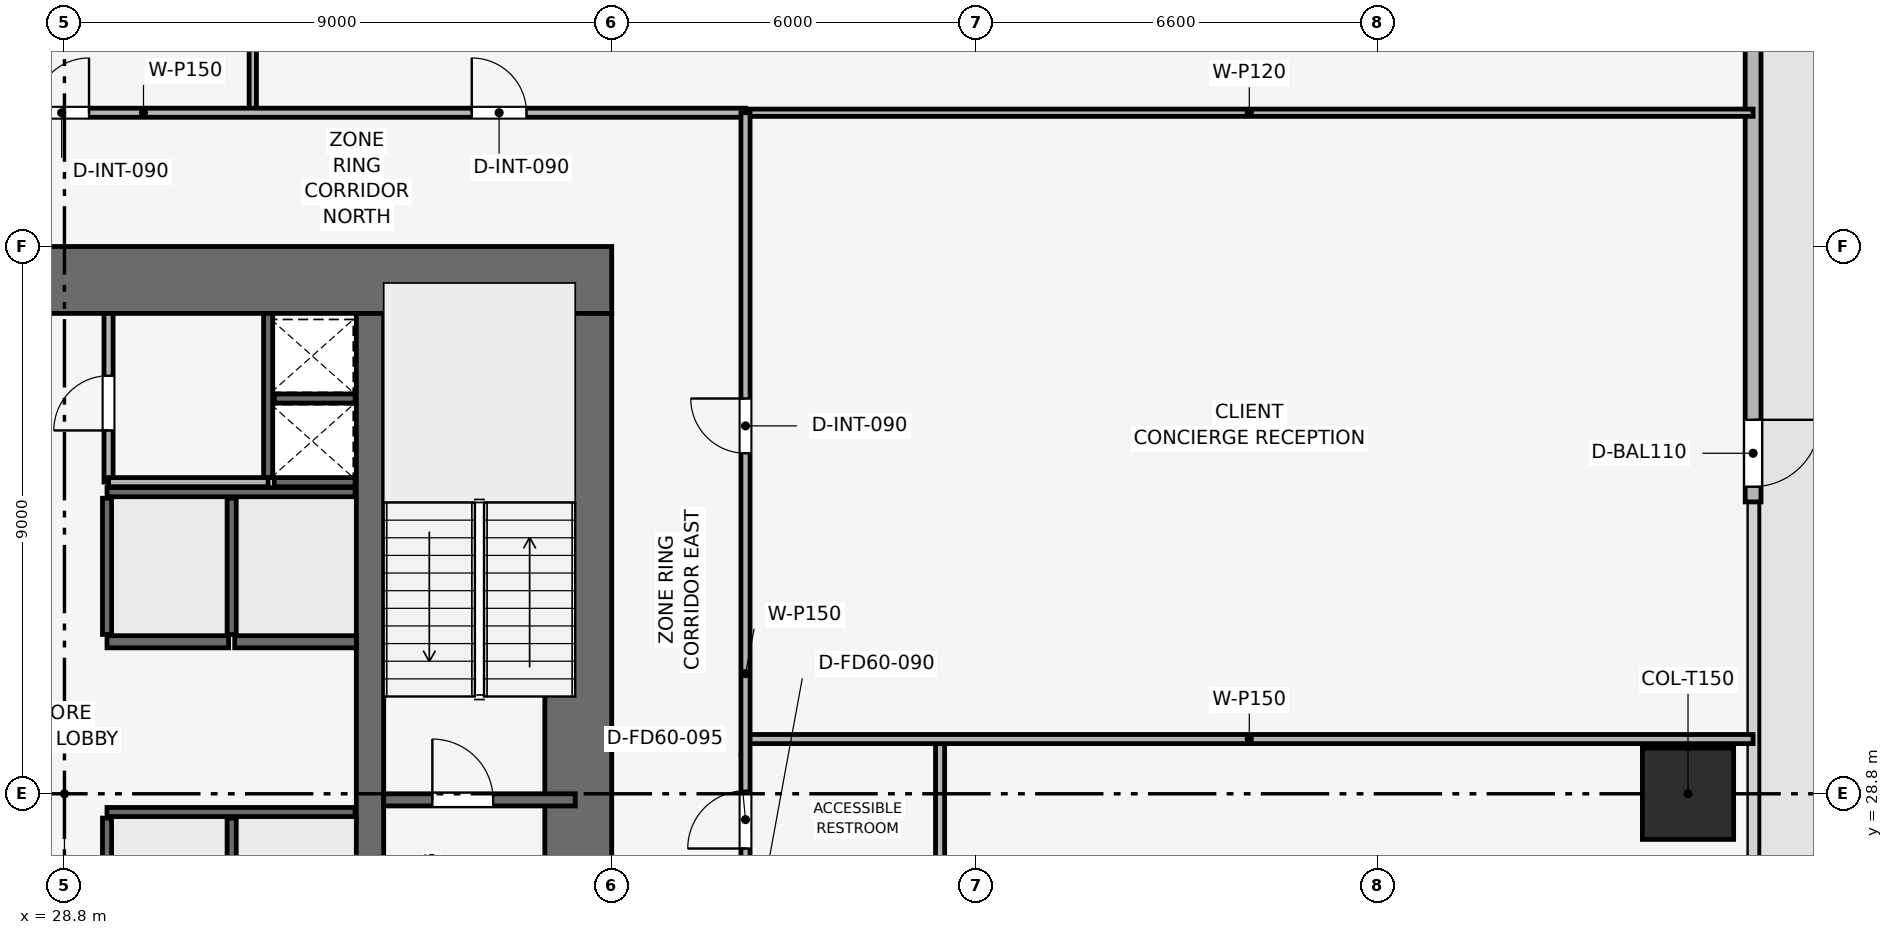
"""IFC4 building model, lengths in metres.
Left out: names, types, materials, properties, quantities, classifications, styles, units other than length and angle.
Written with IfcOpenShell. Run it as: python <this file> out.ifc"""

import sys

from ifc_helpers import new_model, si_unit, direction, frame, frame_2d, origin, origin_2d, place, context, subcontext, project, spatial, rectangle, extrude, element, fill, save


model = new_model("IFC4")
c1 = context("Model", 3, precision=1e-05, world=origin(), true_north=direction((0.0, 1.0)))
c2 = subcontext(c1, "Body", "Model", "MODEL_VIEW")
j1 = project(units=[si_unit("LENGTHUNIT", "METRE"), si_unit("PLANEANGLEUNIT", "RADIAN")], contexts=[c1])
p1 = place(None, origin())
s1 = spatial("IfcSite", under=j1, at=p1, CompositionType="ELEMENT")
p2 = place(p1, origin())
s2 = spatial("IfcBuilding", under=s1, at=p2, CompositionType="ELEMENT")
p3 = place(p2, frame((0.0, 0.0, 72.9)))
s3 = spatial("IfcBuildingStorey", under=s2, at=p3, CompositionType="ELEMENT", Elevation=72.9)
p4 = place(p3, frame((19.8, 37.25, 0.0), z_axis=(0.0, 0.0, 1.0), x_axis=(1.0, 0.0, 0.0)))
e1 = element("IfcWall", 1, at=p4, inside=s3, PredefinedType="SHEAR", context=c2, shape_type="SweptSolid", body=[
    extrude(rectangle(XDim=18.0, YDim=1.1, at=frame_2d((9.0, 0.0))), origin(), (0.0, 0.0, 1.0), 3.9),
])
p5 = place(p4, frame((7.05, 0.0, 0.0)))
e2 = element("IfcOpeningElement", 2, at=p5, cuts=e1, PredefinedType="OPENING", context=c2, shape_type="SweptSolid", body=[
    extrude(rectangle(XDim=1.1, YDim=2.15, at=frame_2d((0.55, 1.075))), frame((0.0, 0.56, 0.0), z_axis=(0.0, -1.0, 0.0), x_axis=(1.0, 0.0, 0.0)), (0.0, 0.0, 1.0), 1.12),
])
p6 = place(p3, frame((37.25, 20.9, 0.0), z_axis=(0.0, 0.0, 1.0), x_axis=(0.0, 1.0, 0.0)))
e3 = element("IfcWall", 3, at=p6, inside=s3, PredefinedType="SHEAR", context=c2, shape_type="SweptSolid", body=[
    extrude(rectangle(XDim=15.8, YDim=1.1, at=frame_2d((7.9, 0.0))), origin(), (0.0, 0.0, 1.0), 3.9),
])
p7 = place(p6, frame((4.4, 0.0, 0.0)))
e4 = element("IfcOpeningElement", 4, at=p7, cuts=e3, PredefinedType="OPENING", context=c2, shape_type="SweptSolid", body=[
    extrude(rectangle(XDim=1.1, YDim=2.15, at=frame_2d((0.55, 1.075))), frame((0.0, 0.56, 0.0), z_axis=(0.0, -1.0, 0.0), x_axis=(1.0, 0.0, 0.0)), (0.0, 0.0, 1.0), 1.12),
])
p8 = place(p3, frame((33.825, 20.9, 0.0), z_axis=(0.0, 0.0, 1.0), x_axis=(0.0, 1.0, 0.0)))
e5 = element("IfcWall", 5, at=p8, inside=s3, PredefinedType="SHEAR", context=c2, shape_type="SweptSolid", body=[
    extrude(rectangle(XDim=15.8, YDim=0.45, at=frame_2d((7.9, 0.0))), origin(), (0.0, 0.0, 1.0), 3.9),
])
p9 = place(p3, frame((55.5, 28.8, 0.003), z_axis=(0.0, 0.0, 1.0), x_axis=(1.0, 0.0, 0.0)))
e6 = element("IfcColumn", 6, at=p9, inside=s3, PredefinedType="COLUMN", context=c2, shape_type="SweptSolid", body=[
    extrude(rectangle(XDim=1.5, YDim=1.5, at=origin_2d()), origin(), (0.0, 0.0, 1.0), 3.644),
])
p10 = place(p3, frame((56.57, 48.9, 0.0), z_axis=(0.0, 0.0, 1.0), x_axis=(0.0, -1.0, 0.0)))
e7 = element("IfcWall", 7, at=p10, inside=s3, PredefinedType="SOLIDWALL", context=c2, shape_type="SweptSolid", body=[
    extrude(rectangle(XDim=15.3, YDim=0.26, at=frame_2d((7.65, 0.0))), origin(), (0.0, 0.0, 1.0), 3.65),
])
p11 = place(p10, frame((13.95, 0.0, 0.0)))
e8 = element("IfcOpeningElement", 8, at=p11, cuts=e7, PredefinedType="OPENING", context=c2, shape_type="SweptSolid", body=[
    extrude(rectangle(XDim=1.1, YDim=2.2, at=frame_2d((0.55, 1.1))), frame((0.0, 0.14, 0.0), z_axis=(0.0, -1.0, 0.0), x_axis=(1.0, 0.0, 0.0)), (0.0, 0.0, 1.0), 0.28),
])
p12 = place(p3, frame((34.05, 28.7, 0.0), z_axis=(0.0, 0.0, 1.0), x_axis=(1.0, 0.0, 0.0)))
e9 = element("IfcWall", 9, at=p12, inside=s3, PredefinedType="SHEAR", context=c2, shape_type="SweptSolid", body=[
    extrude(rectangle(XDim=3.15, YDim=0.2, at=frame_2d((1.575, 0.0))), origin(), (0.0, 0.0, 1.0), 3.65),
])
p13 = place(p12, frame((0.8, 0.0, 0.0)))
e10 = element("IfcOpeningElement", 10, at=p13, cuts=e9, PredefinedType="OPENING", context=c2, shape_type="SweptSolid", body=[
    extrude(rectangle(XDim=1.0, YDim=2.1, at=frame_2d((0.5, 1.05))), frame((0.0, 0.11, 0.0), z_axis=(0.0, -1.0, 0.0), x_axis=(1.0, 0.0, 0.0)), (0.0, 0.0, 1.0), 0.22),
])
p14 = place(p3, frame((32.15, 34.0, 0.0), z_axis=(0.0, 0.0, 1.0), x_axis=(0.0, 1.0, 0.0)))
e11 = element("IfcWall", 11, at=p14, inside=s3, PredefinedType="SHEAR", context=c2, shape_type="SweptSolid", body=[
    extrude(rectangle(XDim=2.7, YDim=0.15, at=frame_2d((1.35, 0.0))), origin(), (0.0, 0.0, 1.0), 3.65),
])
for number, where, z_axis, x_axis in (
    (12, (32.25, 33.925, 0.0), (0.0, 0.0, 1.0), (1.0, 0.0, 0.0)),
    (13, (32.25, 35.3, 0.0), (0.0, 0.0, 1.0), (1.0, 0.0, 0.0)),
):
    element("IfcWall", number, at=place(p3, frame(where, z_axis=z_axis, x_axis=x_axis)), inside=s3, PredefinedType="SHEAR", context=c2, shape_type="SweptSolid", body=[
        extrude(rectangle(XDim=1.33, YDim=0.15, at=frame_2d((0.665, 0.0))), origin(), (0.0, 0.0, 1.0), 3.65),
    ])
for number, where, z_axis, x_axis in (
    (14, (29.5, 31.3, 0.0), (0.0, 0.0, 1.0), (1.0, 0.0, 0.0)),
    (15, (31.6, 31.3, 0.0), (0.0, 0.0, 1.0), (1.0, 0.0, 0.0)),
):
    element("IfcWall", number, at=place(p3, frame(where, z_axis=z_axis, x_axis=x_axis)), inside=s3, PredefinedType="SHEAR", context=c2, shape_type="SweptSolid", body=[
        extrude(rectangle(XDim=2.0, YDim=0.2, at=frame_2d((1.0, 0.0))), origin(), (0.0, 0.0, 1.0), 3.65),
    ])
p15 = place(p3, frame((29.5, 28.5, 0.0), z_axis=(0.0, 0.0, 1.0), x_axis=(1.0, 0.0, 0.0)))
e16 = element("IfcWall", 16, at=p15, inside=s3, PredefinedType="SHEAR", context=c2, shape_type="SweptSolid", body=[
    extrude(rectangle(XDim=4.08, YDim=0.15, at=frame_2d((2.04, 0.0))), origin(), (0.0, 0.0, 1.0), 3.65),
])
for number, where, z_axis, x_axis in (
    (17, (29.5, 26.12, 0.0), (0.0, 0.0, 1.0), (0.0, 1.0, 0.0)),
    (18, (31.55, 26.12, 0.0), (0.0, 0.0, 1.0), (0.0, 1.0, 0.0)),
):
    element("IfcWall", number, at=place(p3, frame(where, z_axis=z_axis, x_axis=x_axis)), inside=s3, PredefinedType="SHEAR", context=c2, shape_type="SweptSolid", body=[
        extrude(rectangle(XDim=2.28, YDim=0.15, at=frame_2d((1.14, 0.0))), origin(), (0.0, 0.0, 1.0), 3.65),
    ])
p16 = place(p3, frame((29.5, 33.76, 0.0), z_axis=(0.0, 0.0, 1.0), x_axis=(1.0, 0.0, 0.0)))
e19 = element("IfcWall", 19, at=p16, inside=s3, PredefinedType="SHEAR", context=c2, shape_type="SweptSolid", body=[
    extrude(rectangle(XDim=4.08, YDim=0.15, at=frame_2d((2.04, 0.0))), origin(), (0.0, 0.0, 1.0), 3.65),
])
for number, where, z_axis, x_axis in (
    (20, (29.5, 31.42, 0.0), (0.0, 0.0, 1.0), (0.0, 1.0, 0.0)),
    (21, (31.55, 31.42, 0.0), (0.0, 0.0, 1.0), (0.0, 1.0, 0.0)),
):
    element("IfcWall", number, at=place(p3, frame(where, z_axis=z_axis, x_axis=x_axis)), inside=s3, PredefinedType="SHEAR", context=c2, shape_type="SweptSolid", body=[
        extrude(rectangle(XDim=2.24, YDim=0.15, at=frame_2d((1.12, 0.0))), origin(), (0.0, 0.0, 1.0), 3.65),
    ])
p17 = place(p3, frame((29.525, 33.925, 0.0), z_axis=(0.0, 0.0, 1.0), x_axis=(0.0, 1.0, 0.0)))
e22 = element("IfcWall", 22, at=p17, inside=s3, PredefinedType="PARTITIONING", context=c2, shape_type="SweptSolid", body=[
    extrude(rectangle(XDim=2.775, YDim=0.15, at=frame_2d((1.387, 0.0))), origin(), (0.0, 0.0, 1.0), 3.65),
])
p18 = place(p17, frame((0.85, 0.0, 0.0)))
e23 = element("IfcOpeningElement", 23, at=p18, cuts=e22, PredefinedType="OPENING", context=c2, shape_type="SweptSolid", body=[
    extrude(rectangle(XDim=0.9, YDim=2.1, at=frame_2d((0.45, 1.05))), frame((0.0, 0.085, 0.0), z_axis=(0.0, -1.0, 0.0), x_axis=(1.0, 0.0, 0.0)), (0.0, 0.0, 1.0), 0.17),
])
p19 = place(p3, frame((29.525, 33.925, 0.0), z_axis=(0.0, 0.0, 1.0), x_axis=(1.0, 0.0, 0.0)))
e24 = element("IfcWall", 24, at=p19, inside=s3, PredefinedType="PARTITIONING", context=c2, shape_type="SweptSolid", body=[
    extrude(rectangle(XDim=2.625, YDim=0.15, at=frame_2d((1.312, 0.0))), origin(), (0.0, 0.0, 1.0), 3.65),
])
for number, where, z_axis, x_axis in (
    (25, (31.897, 40.0, 0.0), (0.0, 0.0, 1.0), (0.0, 1.0, 0.0)),
    (26, (40.0, 40.0, 0.0), (0.0, 0.0, 1.0), (1.0, 0.0, 0.0)),
):
    element("IfcWall", number, at=place(p3, frame(where, z_axis=z_axis, x_axis=x_axis)), inside=s3, PredefinedType="PARTITIONING", context=c2, shape_type="SweptSolid", body=[
        extrude(rectangle(XDim=16.57, YDim=0.12, at=frame_2d((8.285, 0.0))), origin(), (0.0, 0.0, 1.0), 2.935),
    ])
p20 = place(p3, frame((43.2, 21.3, 0.0), z_axis=(0.0, 0.0, 1.0), x_axis=(0.0, 1.0, 0.0)))
e27 = element("IfcWall", 27, at=p20, inside=s3, PredefinedType="PARTITIONING", context=c2, shape_type="SweptSolid", body=[
    extrude(rectangle(XDim=8.4, YDim=0.15, at=frame_2d((4.2, 0.0))), origin(), (0.0, 0.0, 1.0), 3.085),
])
p21 = place(p3, frame((40.0, 29.7, 0.0), z_axis=(0.0, 0.0, 1.0), x_axis=(1.0, 0.0, 0.0)))
e28 = element("IfcWall", 28, at=p21, inside=s3, PredefinedType="PARTITIONING", context=c2, shape_type="SweptSolid", body=[
    extrude(rectangle(XDim=16.57, YDim=0.15, at=frame_2d((8.285, 0.0))), origin(), (0.0, 0.0, 1.0), 2.935),
])
p22 = place(p3, frame((17.6, 40.0, 0.0), z_axis=(0.0, 0.0, 1.0), x_axis=(1.0, 0.0, 0.0)))
e29 = element("IfcWall", 29, at=p22, inside=s3, PredefinedType="PARTITIONING", context=c2, shape_type="SweptSolid", body=[
    extrude(rectangle(XDim=22.4, YDim=0.15, at=frame_2d((11.2, 0.0))), origin(), (0.0, 0.0, 1.0), 3.085),
])
p23 = place(p22, frame((0.7, 0.0, 0.0)))
e30 = element("IfcOpeningElement", 30, at=p23, cuts=e29, PredefinedType="OPENING", context=c2, shape_type="SweptSolid", body=[
    extrude(rectangle(XDim=0.9, YDim=2.1, at=frame_2d((0.45, 1.05))), frame((0.0, 0.085, 0.0), z_axis=(0.0, -1.0, 0.0), x_axis=(1.0, 0.0, 0.0)), (0.0, 0.0, 1.0), 0.17),
])
p24 = place(p22, frame((4.706, 0.0, 0.0)))
e31 = element("IfcOpeningElement", 31, at=p24, cuts=e29, PredefinedType="OPENING", context=c2, shape_type="SweptSolid", body=[
    extrude(rectangle(XDim=0.9, YDim=2.1, at=frame_2d((0.45, 1.05))), frame((0.0, 0.085, 0.0), z_axis=(0.0, -1.0, 0.0), x_axis=(1.0, 0.0, 0.0)), (0.0, 0.0, 1.0), 0.17),
])
p25 = place(p22, frame((10.704, 0.0, 0.0)))
e32 = element("IfcOpeningElement", 32, at=p25, cuts=e29, PredefinedType="OPENING", context=c2, shape_type="SweptSolid", body=[
    extrude(rectangle(XDim=0.9, YDim=2.1, at=frame_2d((0.45, 1.05))), frame((0.0, 0.085, 0.0), z_axis=(0.0, -1.0, 0.0), x_axis=(1.0, 0.0, 0.0)), (0.0, 0.0, 1.0), 0.17),
])
p26 = place(p22, frame((17.898, 0.0, 0.0)))
e33 = element("IfcOpeningElement", 33, at=p26, cuts=e29, PredefinedType="OPENING", context=c2, shape_type="SweptSolid", body=[
    extrude(rectangle(XDim=0.9, YDim=2.1, at=frame_2d((0.45, 1.05))), frame((0.0, 0.085, 0.0), z_axis=(0.0, -1.0, 0.0), x_axis=(1.0, 0.0, 0.0)), (0.0, 0.0, 1.0), 0.17),
])
p27 = place(p3, frame((40.0, 17.6, 0.0), z_axis=(0.0, 0.0, 1.0), x_axis=(0.0, 1.0, 0.0)))
e34 = element("IfcWall", 34, at=p27, inside=s3, PredefinedType="PARTITIONING", context=c2, shape_type="SweptSolid", body=[
    extrude(rectangle(XDim=22.4, YDim=0.15, at=frame_2d((11.2, 0.0))), origin(), (0.0, 0.0, 1.0), 3.085),
])
p28 = place(p27, frame((1.4, 0.0, 0.0)))
e35 = element("IfcOpeningElement", 35, at=p28, cuts=e34, PredefinedType="OPENING", context=c2, shape_type="SweptSolid", body=[
    extrude(rectangle(XDim=0.9, YDim=2.1, at=frame_2d((0.45, 1.05))), frame((0.0, 0.085, 0.0), z_axis=(0.0, -1.0, 0.0), x_axis=(1.0, 0.0, 0.0)), (0.0, 0.0, 1.0), 0.17),
])
p29 = place(p27, frame((4.65, 0.0, 0.0)))
e36 = element("IfcOpeningElement", 36, at=p29, cuts=e34, PredefinedType="OPENING", context=c2, shape_type="SweptSolid", body=[
    extrude(rectangle(XDim=0.9, YDim=2.1, at=frame_2d((0.45, 1.05))), frame((0.0, 0.085, 0.0), z_axis=(0.0, -1.0, 0.0), x_axis=(1.0, 0.0, 0.0)), (0.0, 0.0, 1.0), 0.17),
])
p30 = place(p27, frame((7.55, 0.0, 0.0)))
e37 = element("IfcOpeningElement", 37, at=p30, cuts=e34, PredefinedType="OPENING", context=c2, shape_type="SweptSolid", body=[
    extrude(rectangle(XDim=0.9, YDim=2.1, at=frame_2d((0.45, 1.05))), frame((0.0, 0.085, 0.0), z_axis=(0.0, -1.0, 0.0), x_axis=(1.0, 0.0, 0.0)), (0.0, 0.0, 1.0), 0.17),
])
p31 = place(p27, frame((10.3, 0.0, 0.0)))
e38 = element("IfcOpeningElement", 38, at=p31, cuts=e34, PredefinedType="OPENING", context=c2, shape_type="SweptSolid", body=[
    extrude(rectangle(XDim=0.95, YDim=2.1, at=frame_2d((0.475, 1.05))), frame((0.0, 0.085, 0.0), z_axis=(0.0, -1.0, 0.0), x_axis=(1.0, 0.0, 0.0)), (0.0, 0.0, 1.0), 0.17),
])
p32 = place(p27, frame((16.8, 0.0, 0.0)))
e39 = element("IfcOpeningElement", 39, at=p32, cuts=e34, PredefinedType="OPENING", context=c2, shape_type="SweptSolid", body=[
    extrude(rectangle(XDim=0.9, YDim=2.1, at=frame_2d((0.45, 1.05))), frame((0.0, 0.085, 0.0), z_axis=(0.0, -1.0, 0.0), x_axis=(1.0, 0.0, 0.0)), (0.0, 0.0, 1.0), 0.17),
])
p33 = place(p11, origin())
e40 = element("IfcDoor", 40, at=p33, inside=s3, OperationType="SINGLE_SWING_LEFT", PredefinedType="DOOR", context=c2, shape_type="SweptSolid", body=[
    extrude(rectangle(XDim=1.1, YDim=2.2, at=frame_2d((0.55, 1.1))), frame((0.0, 0.025, 0.0), z_axis=(0.0, -1.0, 0.0), x_axis=(1.0, 0.0, 0.0)), (0.0, 0.0, 1.0), 0.05),
])
fill(e8, e40)
p34 = place(p13, origin())
e41 = element("IfcDoor", 41, at=p34, inside=s3, OperationType="SINGLE_SWING_LEFT", PredefinedType="DOOR", context=c2, shape_type="SweptSolid", body=[
    extrude(rectangle(XDim=1.0, YDim=2.1, at=frame_2d((0.5, 1.05))), frame((0.0, 0.025, 0.0), z_axis=(0.0, -1.0, 0.0), x_axis=(1.0, 0.0, 0.0)), (0.0, 0.0, 1.0), 0.05),
])
fill(e10, e41)
p35 = place(p18, origin())
e42 = element("IfcDoor", 42, at=p35, inside=s3, OperationType="SINGLE_SWING_LEFT", PredefinedType="DOOR", context=c2, shape_type="SweptSolid", body=[
    extrude(rectangle(XDim=0.9, YDim=2.1, at=frame_2d((0.45, 1.05))), frame((0.0, 0.025, 0.0), z_axis=(0.0, -1.0, 0.0), x_axis=(1.0, 0.0, 0.0)), (0.0, 0.0, 1.0), 0.05),
])
fill(e23, e42)
p36 = place(p25, origin())
e43 = element("IfcDoor", 43, at=p36, inside=s3, OperationType="SINGLE_SWING_RIGHT", PredefinedType="DOOR", context=c2, shape_type="SweptSolid", body=[
    extrude(rectangle(XDim=0.9, YDim=2.1, at=frame_2d((0.45, 1.05))), frame((0.0, 0.025, 0.0), z_axis=(0.0, -1.0, 0.0), x_axis=(1.0, 0.0, 0.0)), (0.0, 0.0, 1.0), 0.05),
])
fill(e32, e43)
p37 = place(p26, origin())
e44 = element("IfcDoor", 44, at=p37, inside=s3, OperationType="SINGLE_SWING_LEFT", PredefinedType="DOOR", context=c2, shape_type="SweptSolid", body=[
    extrude(rectangle(XDim=0.9, YDim=2.1, at=frame_2d((0.45, 1.05))), frame((0.0, 0.025, 0.0), z_axis=(0.0, -1.0, 0.0), x_axis=(1.0, 0.0, 0.0)), (0.0, 0.0, 1.0), 0.05),
])
fill(e33, e44)
p38 = place(p31, origin())
e45 = element("IfcDoor", 45, at=p38, inside=s3, OperationType="SINGLE_SWING_LEFT", PredefinedType="DOOR", context=c2, shape_type="SweptSolid", body=[
    extrude(rectangle(XDim=0.95, YDim=2.1, at=frame_2d((0.475, 1.05))), frame((0.0, 0.025, 0.0), z_axis=(0.0, -1.0, 0.0), x_axis=(1.0, 0.0, 0.0)), (0.0, 0.0, 1.0), 0.05),
])
fill(e38, e45)
p39 = place(p32, origin())
e46 = element("IfcDoor", 46, at=p39, inside=s3, OperationType="SINGLE_SWING_RIGHT", PredefinedType="DOOR", context=c2, shape_type="SweptSolid", body=[
    extrude(rectangle(XDim=0.9, YDim=2.1, at=frame_2d((0.45, 1.05))), frame((0.0, 0.025, 0.0), z_axis=(0.0, -1.0, 0.0), x_axis=(1.0, 0.0, 0.0)), (0.0, 0.0, 1.0), 0.05),
])
fill(e39, e46)
save(model, sys.argv[1])
